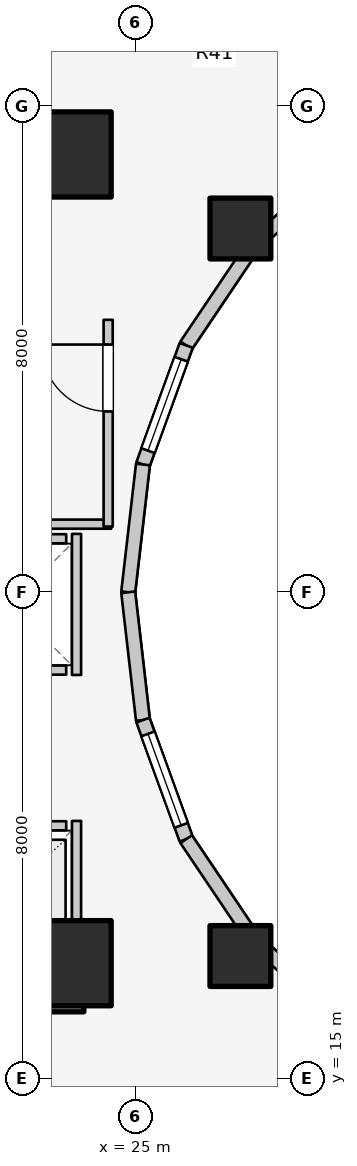
"""IFC4 building model, lengths in metres.
Left out: names, types, materials, properties, quantities, classifications, styles, units other than length and angle.
Written with IfcOpenShell. Run it as: python <this file> out.ifc"""

import sys

from ifc_helpers import new_model, si_unit, direction, frame, frame_2d, origin, origin_2d, place, context, subcontext, project, spatial, rectangle, extrude, element, fill, save


model = new_model("IFC4")
c1 = context("Model", 3, precision=1e-05, world=origin(), true_north=direction((0.0, 1.0)))
c2 = subcontext(c1, "Body", "Model", "MODEL_VIEW")
j1 = project(units=[si_unit("LENGTHUNIT", "METRE"), si_unit("PLANEANGLEUNIT", "RADIAN")], contexts=[c1])
p1 = place(None, origin())
s1 = spatial("IfcSite", under=j1, at=p1, CompositionType="ELEMENT")
p2 = place(p1, origin())
s2 = spatial("IfcBuilding", under=s1, at=p2, CompositionType="ELEMENT")
p3 = place(p2, frame((0.0, 0.0, 36.9)))
s3 = spatial("IfcBuildingStorey", under=s2, at=p3, CompositionType="ELEMENT", Elevation=36.9)
for number, where, z_axis, x_axis in (
    (1, (19.65, 16.55, 0.0), (0.0, 0.0, 1.0), (1.0, 0.0, 0.0)),
    (2, (19.65, 30.35, 0.0), (0.0, 0.0, 1.0), (1.0, 0.0, 0.0)),
):
    element("IfcWall", number, at=place(p3, frame(where, z_axis=z_axis, x_axis=x_axis)), inside=s3, PredefinedType="SHEAR", context=c2, shape_type="SweptSolid", body=[
        extrude(rectangle(XDim=4.5, YDim=0.9, at=frame_2d((2.25, 0.0))), origin(), (0.0, 0.0, 1.0), 3.1),
    ])
for number, where, z_axis, x_axis in (
    (3, (23.9, 16.9, 0.0), (0.0, 0.0, 1.0), (1.0, 0.0, 0.0)),
    (4, (23.9, 30.2, 0.0), (0.0, 0.0, 1.0), (1.0, 0.0, 0.0)),
):
    element("IfcColumn", number, at=place(p3, frame(where, z_axis=z_axis, x_axis=x_axis)), inside=s3, PredefinedType="COLUMN", context=c2, shape_type="SweptSolid", body=[
        extrude(rectangle(XDim=1.4, YDim=1.4, at=origin_2d()), origin(), (0.0, 0.0, 1.0), 3.1),
    ])
for number, where, z_axis, x_axis in (
    (5, (26.725, 28.982, 0.0), (0.0, 0.0, 1.0), (1.0, 0.0, 0.0)),
    (6, (26.725, 17.018, 0.0), (0.0, 0.0, 1.0), (1.0, 0.0, 0.0)),
):
    element("IfcColumn", number, at=place(p3, frame(where, z_axis=z_axis, x_axis=x_axis)), inside=s3, PredefinedType="COLUMN", context=c2, shape_type="SweptSolid", body=[
        extrude(rectangle(XDim=1.0, YDim=1.0, at=origin_2d()), origin(), (0.0, 0.0, 1.0), 3.1),
    ])
p4 = place(p3, frame((28.44, 30.032, 0.0), z_axis=(0.0, 0.0, 1.0), x_axis=(-0.752576694707, -0.658504607869, 0.0)))
e7 = element("IfcWall", 7, at=p4, inside=s3, PredefinedType="STANDARD", context=c2, shape_type="SweptSolid", body=[
    extrude(rectangle(XDim=1.959, YDim=0.23, at=frame_2d((0.98, 0.0))), origin(), (0.0, 0.0, 1.0), 2.16),
])
p5 = place(p3, frame((26.965, 28.742, 0.0), z_axis=(0.0, 0.0, 1.0), x_axis=(-0.558197800898, -0.829707909492, 0.0)))
e8 = element("IfcWall", 8, at=p5, inside=s3, PredefinedType="STANDARD", context=c2, shape_type="SweptSolid", body=[
    extrude(rectangle(XDim=2.027, YDim=0.23, at=frame_2d((1.013, 0.0))), origin(), (0.0, 0.0, 1.0), 2.16),
])
p6 = place(p3, frame((25.834, 27.06, 0.0), z_axis=(0.0, 0.0, 1.0), x_axis=(-0.341423187295, -0.93990968033, 0.0)))
e9 = element("IfcWall", 9, at=p6, inside=s3, PredefinedType="STANDARD", context=c2, shape_type="SweptSolid", body=[
    extrude(rectangle(XDim=2.084, YDim=0.23, at=frame_2d((1.042, 0.0))), origin(), (0.0, 0.0, 1.0), 2.84),
])
p7 = place(p6, frame((0.242, 0.0, 0.85)))
e10 = element("IfcOpeningElement", 10, at=p7, cuts=e9, PredefinedType="OPENING", context=c2, shape_type="SweptSolid", body=[
    extrude(rectangle(XDim=1.6, YDim=1.65, at=frame_2d((0.8, 0.825))), frame((0.0, 0.125, 0.0), z_axis=(0.0, -1.0, 0.0), x_axis=(1.0, 0.0, 0.0)), (0.0, 0.0, 1.0), 0.25),
])
for number, where, z_axis, x_axis in (
    (11, (25.123, 25.102, 0.0), (0.0, 0.0, 1.0), (-0.115, -0.993, 0.0)),
    (12, (24.88, 23.0, 0.0), (0.0, 0.0, 1.0), (0.115, -0.993, 0.0)),
):
    element("IfcWall", number, at=place(p3, frame(where, z_axis=z_axis, x_axis=x_axis)), inside=s3, PredefinedType="STANDARD", context=c2, shape_type="SweptSolid", body=[
        extrude(rectangle(XDim=2.115, YDim=0.23, at=frame_2d((1.058, 0.0))), origin(), (0.0, 0.0, 1.0), 2.84),
    ])
p8 = place(p3, frame((25.123, 20.898, 0.0), z_axis=(0.0, 0.0, 1.0), x_axis=(0.341423187295, -0.93990968033, 0.0)))
e13 = element("IfcWall", 13, at=p8, inside=s3, PredefinedType="STANDARD", context=c2, shape_type="SweptSolid", body=[
    extrude(rectangle(XDim=2.084, YDim=0.23, at=frame_2d((1.042, 0.0))), origin(), (0.0, 0.0, 1.0), 2.84),
])
p9 = place(p8, frame((0.242, 0.0, 0.85)))
e14 = element("IfcOpeningElement", 14, at=p9, cuts=e13, PredefinedType="OPENING", context=c2, shape_type="SweptSolid", body=[
    extrude(rectangle(XDim=1.6, YDim=1.65, at=frame_2d((0.8, 0.825))), frame((0.0, 0.125, 0.0), z_axis=(0.0, -1.0, 0.0), x_axis=(1.0, 0.0, 0.0)), (0.0, 0.0, 1.0), 0.25),
])
p10 = place(p3, frame((25.834, 18.94, 0.0), z_axis=(0.0, 0.0, 1.0), x_axis=(0.558197800898, -0.829707909492, 0.0)))
e15 = element("IfcWall", 15, at=p10, inside=s3, PredefinedType="STANDARD", context=c2, shape_type="SweptSolid", body=[
    extrude(rectangle(XDim=2.027, YDim=0.23, at=frame_2d((1.013, 0.0))), origin(), (0.0, 0.0, 1.0), 2.16),
])
p11 = place(p3, frame((26.965, 17.258, 0.0), z_axis=(0.0, 0.0, 1.0), x_axis=(0.752576694707, -0.658504607869, 0.0)))
e16 = element("IfcWall", 16, at=p11, inside=s3, PredefinedType="STANDARD", context=c2, shape_type="SweptSolid", body=[
    extrude(rectangle(XDim=1.959, YDim=0.23, at=frame_2d((0.98, 0.0))), origin(), (0.0, 0.0, 1.0), 2.16),
])
p12 = place(p3, frame((22.04, 19.16, 0.0), z_axis=(0.0, 0.0, 1.0), x_axis=(1.0, 0.0, 0.0)))
e17 = element("IfcWall", 17, at=p12, inside=s3, PredefinedType="SOLIDWALL", context=c2, shape_type="SweptSolid", body=[
    extrude(rectangle(XDim=1.82, YDim=0.15, at=frame_2d((0.91, 0.0))), origin(), (0.0, 0.0, 1.0), 2.12),
])
p13 = place(p12, frame((0.36, 0.0, 0.0)))
e18 = element("IfcOpeningElement", 18, at=p13, cuts=e17, PredefinedType="OPENING", context=c2, shape_type="SweptSolid", body=[
    extrude(rectangle(XDim=1.1, YDim=2.1, at=frame_2d((0.55, 1.05))), frame((0.0, 0.085, 0.0), z_axis=(0.0, -1.0, 0.0), x_axis=(1.0, 0.0, 0.0)), (0.0, 0.0, 1.0), 0.17),
])
p14 = place(p3, frame((22.04, 17.1, 0.0), z_axis=(0.0, 0.0, 1.0), x_axis=(1.0, 0.0, 0.0)))
e19 = element("IfcWall", 19, at=p14, inside=s3, PredefinedType="SOLIDWALL", context=c2, shape_type="SweptSolid", body=[
    extrude(rectangle(XDim=1.82, YDim=0.15, at=frame_2d((0.91, 0.0))), origin(), (0.0, 0.0, 1.0), 2.12),
])
p15 = place(p3, frame((24.03, 17.02, 0.0), z_axis=(0.0, 0.0, 1.0), x_axis=(0.0, 1.0, 0.0)))
e20 = element("IfcWall", 20, at=p15, inside=s3, PredefinedType="SOLIDWALL", context=c2, shape_type="SweptSolid", body=[
    extrude(rectangle(XDim=2.22, YDim=0.15, at=frame_2d((1.11, 0.0))), origin(), (0.0, 0.0, 1.0), 2.12),
])
for number, where, z_axis, x_axis in (
    (21, (22.04, 21.72, 0.0), (0.0, 0.0, 1.0), (1.0, 0.0, 0.0)),
    (22, (22.04, 23.88, 0.0), (0.0, 0.0, 1.0), (1.0, 0.0, 0.0)),
):
    element("IfcWall", number, at=place(p3, frame(where, z_axis=z_axis, x_axis=x_axis)), inside=s3, PredefinedType="SOLIDWALL", context=c2, shape_type="SweptSolid", body=[
        extrude(rectangle(XDim=1.82, YDim=0.15, at=frame_2d((0.91, 0.0))), origin(), (0.0, 0.0, 1.0), 2.12),
    ])
p16 = place(p3, frame((24.03, 21.64, 0.0), z_axis=(0.0, 0.0, 1.0), x_axis=(0.0, 1.0, 0.0)))
e23 = element("IfcWall", 23, at=p16, inside=s3, PredefinedType="SOLIDWALL", context=c2, shape_type="SweptSolid", body=[
    extrude(rectangle(XDim=2.32, YDim=0.15, at=frame_2d((1.16, 0.0))), origin(), (0.0, 0.0, 1.0), 2.12),
])
p17 = place(p3, frame((19.52, 24.12, 0.0), z_axis=(0.0, 0.0, 1.0), x_axis=(1.0, 0.0, 0.0)))
e24 = element("IfcWall", 24, at=p17, inside=s3, PredefinedType="PARTITIONING", context=c2, shape_type="SweptSolid", body=[
    extrude(rectangle(XDim=5.08, YDim=0.15, at=frame_2d((2.54, 0.0))), origin(), (0.0, 0.0, 1.0), 2.12),
])
p18 = place(p3, frame((24.55, 24.08, 0.0), z_axis=(0.0, 0.0, 1.0), x_axis=(0.0, 1.0, 0.0)))
e25 = element("IfcWall", 25, at=p18, inside=s3, PredefinedType="PARTITIONING", context=c2, shape_type="SweptSolid", body=[
    extrude(rectangle(XDim=3.4, YDim=0.15, at=frame_2d((1.7, 0.0))), origin(), (0.0, 0.0, 1.0), 2.855),
])
p19 = place(p18, frame((1.894, 0.0, 0.0)))
e26 = element("IfcOpeningElement", 26, at=p19, cuts=e25, PredefinedType="OPENING", context=c2, shape_type="SweptSolid", body=[
    extrude(rectangle(XDim=1.1, YDim=2.1, at=frame_2d((0.55, 1.05))), frame((0.0, 0.085, 0.0), z_axis=(0.0, -1.0, 0.0), x_axis=(1.0, 0.0, 0.0)), (0.0, 0.0, 1.0), 0.17),
])
p20 = place(p7, origin())
e27 = element("IfcWindow", 27, at=p20, inside=s3, PartitioningType="SINGLE_PANEL", PredefinedType="WINDOW", context=c2, shape_type="SweptSolid", body=[
    extrude(rectangle(XDim=1.6, YDim=1.65, at=frame_2d((0.8, 0.825))), frame((0.0, 0.03, 0.0), z_axis=(0.0, -1.0, 0.0), x_axis=(1.0, 0.0, 0.0)), (0.0, 0.0, 1.0), 0.06),
])
fill(e10, e27)
p21 = place(p9, origin())
e28 = element("IfcWindow", 28, at=p21, inside=s3, PartitioningType="SINGLE_PANEL", PredefinedType="WINDOW", context=c2, shape_type="SweptSolid", body=[
    extrude(rectangle(XDim=1.6, YDim=1.65, at=frame_2d((0.8, 0.825))), frame((0.0, 0.03, 0.0), z_axis=(0.0, -1.0, 0.0), x_axis=(1.0, 0.0, 0.0)), (0.0, 0.0, 1.0), 0.06),
])
fill(e14, e28)
p22 = place(p19, origin())
e29 = element("IfcDoor", 29, at=p22, inside=s3, OperationType="SINGLE_SWING_RIGHT", PredefinedType="DOOR", context=c2, shape_type="SweptSolid", body=[
    extrude(rectangle(XDim=1.1, YDim=2.1, at=frame_2d((0.55, 1.05))), frame((0.0, 0.025, 0.0), z_axis=(0.0, -1.0, 0.0), x_axis=(1.0, 0.0, 0.0)), (0.0, 0.0, 1.0), 0.05),
])
fill(e26, e29)
save(model, sys.argv[1])
